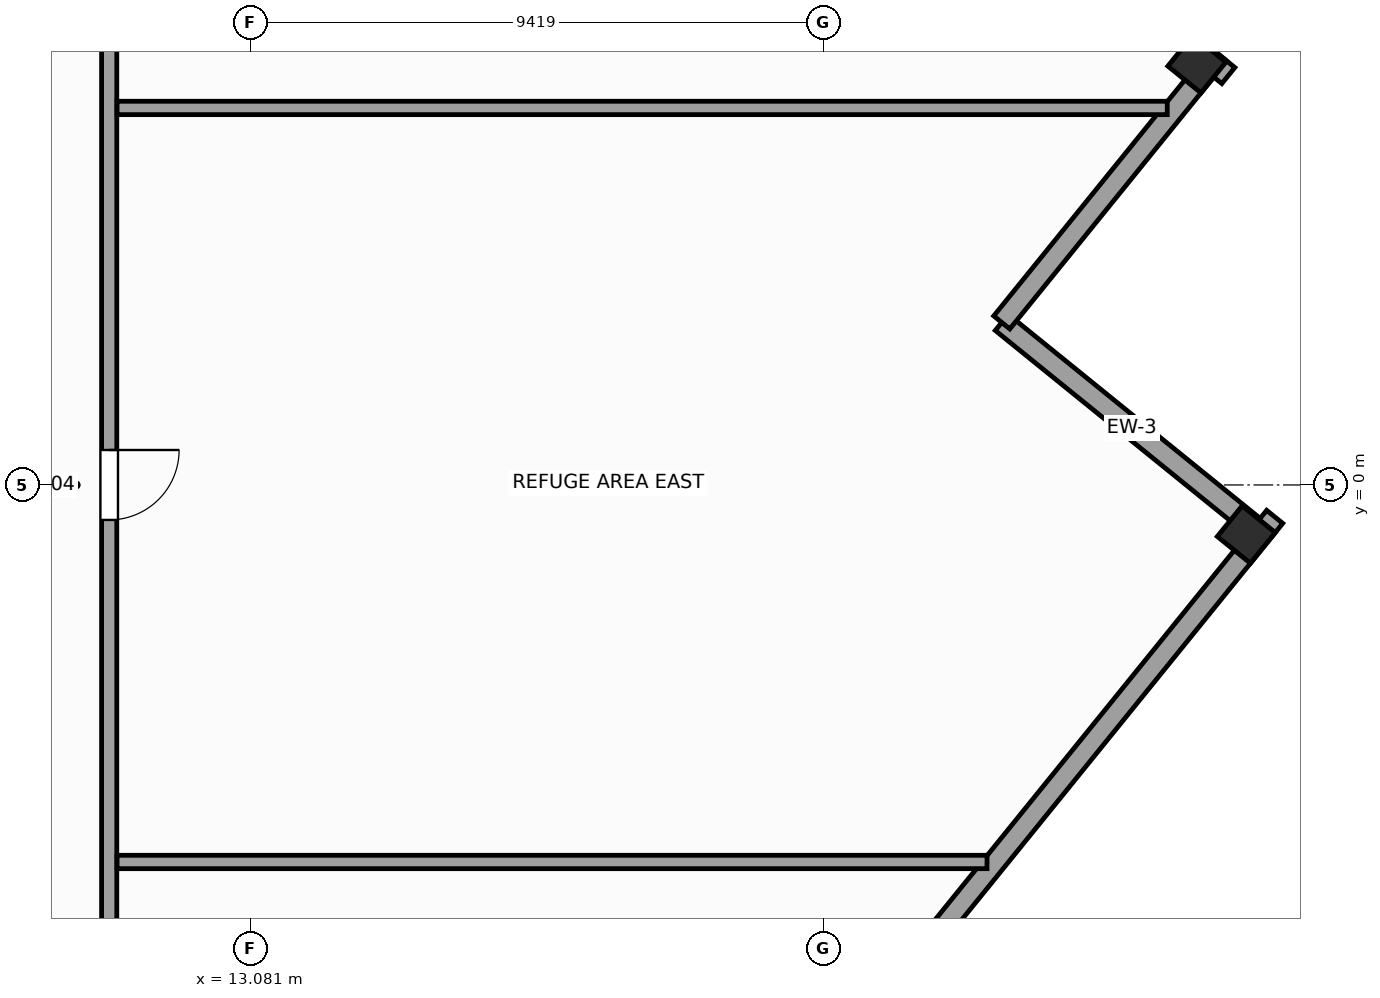
"""IFC4 building model, lengths in metres.
Left out: names, types, materials, properties, quantities, classifications, styles, units other than length and angle.
Written with IfcOpenShell. Run it as: python <this file> out.ifc"""

import sys

from ifc_helpers import new_model, si_unit, direction, frame, frame_2d, origin, origin_2d, place, context, subcontext, project, spatial, rectangle, extrude, source, transform, mapped, element, fill, save


model = new_model("IFC4")
c1 = context("Model", 3, precision=1e-05, world=origin(), true_north=direction((0.0, 1.0)))
c2 = subcontext(c1, "Body", "Model", "MODEL_VIEW")
j1 = project(units=[si_unit("LENGTHUNIT", "METRE"), si_unit("PLANEANGLEUNIT", "RADIAN")], contexts=[c1])
p1 = place(None, origin())
s1 = spatial("IfcSite", under=j1, at=p1, CompositionType="ELEMENT")
p2 = place(p1, origin())
s2 = spatial("IfcBuilding", under=s1, at=p2, CompositionType="ELEMENT")
p3 = place(p2, frame((0.0, 0.0, 200.4)))
s3 = spatial("IfcBuildingStorey", under=s2, at=p3, CompositionType="ELEMENT", Elevation=200.4)
m1 = source(origin(), c2, "Body", "SweptSolid", [
    extrude(rectangle(XDim=0.65, YDim=0.7, at=origin_2d()), origin(), (0.0, 0.0, 1.0), 5.2),
])
for number, where, z_axis, x_axis in (
    (1, (29.45, -0.815, 0.0), (0.0, 0.0, 1.0), (0.629, 0.777, 0.0)),
    (2, (28.637, 6.92, 0.0), (0.0, 0.0, 1.0), (0.629, 0.777, 0.0)),
):
    element("IfcColumn", number, at=place(p3, frame(where, z_axis=z_axis, x_axis=x_axis)), inside=s3, PredefinedType="COLUMN", context=c2, shape_type="MappedRepresentation", body=[
        mapped(m1, transform((0.0, 0.0, 0.0), scale=1.0)),
    ])
p4 = place(p3, frame((29.703, -0.789, 0.0), z_axis=(0.0, 0.0, 1.0), x_axis=(-0.77714355312, 0.629323365087, 0.0)))
e3 = element("IfcWall", 3, at=p4, inside=s3, PredefinedType="STANDARD", context=c2, shape_type="SweptSolid", body=[
    extrude(rectangle(XDim=5.5, YDim=0.34, at=frame_2d((2.75, 0.0))), origin(), (0.0, 0.0, 1.0), 4.96),
])
p5 = place(p3, frame((25.429, 2.673, 0.0), z_axis=(0.0, 0.0, 1.0), x_axis=(0.629299794138, 0.777162640055, 0.0)))
e4 = element("IfcWall", 4, at=p5, inside=s3, PredefinedType="STANDARD", context=c2, shape_type="SweptSolid", body=[
    extrude(rectangle(XDim=5.67, YDim=0.34, at=frame_2d((2.835, 0.0))), origin(), (0.0, 0.0, 1.0), 4.96),
])
p6 = place(p3, frame((17.696, -15.616, 0.0), z_axis=(0.0, 0.0, 1.0), x_axis=(0.629324798011, 0.777142392749, 0.0)))
e5 = element("IfcWall", 5, at=p6, inside=s3, PredefinedType="STANDARD", context=c2, shape_type="SweptSolid", body=[
    extrude(rectangle(XDim=19.42, YDim=0.34, at=frame_2d((9.71, 0.0))), origin(), (0.0, 0.0, 1.0), 4.26),
])
p7 = place(p6, frame((7.739, 0.0, 0.65)))
e6 = element("IfcOpeningElement", 6, at=p7, cuts=e5, PredefinedType="OPENING", context=c2, shape_type="SweptSolid", body=[
    extrude(rectangle(XDim=2.0, YDim=1.45, at=frame_2d((1.0, 0.725))), frame((0.0, 0.18, 0.0), z_axis=(0.0, -1.0, 0.0), x_axis=(1.0, 0.0, 0.0)), (0.0, 0.0, 1.0), 0.36),
])
p8 = place(p3, frame((29.154, 6.733, 0.0), z_axis=(0.0, 0.0, 1.0), x_axis=(-0.777138681893, 0.629329380456, 0.0)))
e7 = element("IfcWall", 7, at=p8, inside=s3, PredefinedType="STANDARD", context=c2, shape_type="SweptSolid", body=[
    extrude(rectangle(XDim=18.42, YDim=0.34, at=frame_2d((9.21, 0.0))), origin(), (0.0, 0.0, 1.0), 4.26),
])
p9 = place(p3, frame((10.75, -12.05, 0.0), z_axis=(0.0, 0.0, 1.0), x_axis=(0.0, 1.0, 0.0)))
e8 = element("IfcWall", 8, at=p9, inside=s3, PredefinedType="PARTITIONING", context=c2, shape_type="SweptSolid", body=[
    extrude(rectangle(XDim=24.1, YDim=0.25, at=frame_2d((12.05, 0.0))), origin(), (0.0, 0.0, 1.0), 4.96),
])
p10 = place(p9, frame((20.436, 0.0, 0.0)))
e9 = element("IfcOpeningElement", 9, at=p10, cuts=e8, PredefinedType="OPENING", context=c2, shape_type="SweptSolid", body=[
    extrude(rectangle(XDim=1.15, YDim=2.25, at=frame_2d((0.575, 1.125))), frame((0.0, 0.135, 0.0), z_axis=(0.0, -1.0, 0.0), x_axis=(1.0, 0.0, 0.0)), (0.0, 0.0, 1.0), 0.27),
])
p11 = place(p9, frame((11.475, 0.0, 0.0)))
e10 = element("IfcOpeningElement", 10, at=p11, cuts=e8, PredefinedType="OPENING", context=c2, shape_type="SweptSolid", body=[
    extrude(rectangle(XDim=1.15, YDim=2.25, at=frame_2d((0.575, 1.125))), frame((0.0, 0.135, 0.0), z_axis=(0.0, -1.0, 0.0), x_axis=(1.0, 0.0, 0.0)), (0.0, 0.0, 1.0), 0.27),
])
p12 = place(p3, frame((10.88, 6.2, 0.0), z_axis=(0.0, 0.0, 1.0), x_axis=(1.0, 0.0, 0.0)))
e11 = element("IfcWall", 11, at=p12, inside=s3, PredefinedType="PARTITIONING", context=c2, shape_type="SweptSolid", body=[
    extrude(rectangle(XDim=17.27, YDim=0.22, at=frame_2d((8.635, 0.0))), origin(), (0.0, 0.0, 1.0), 4.96),
])
p13 = place(p3, frame((10.88, -6.2, 0.0), z_axis=(0.0, 0.0, 1.0), x_axis=(1.0, 0.0, 0.0)))
e12 = element("IfcWall", 12, at=p13, inside=s3, PredefinedType="PARTITIONING", context=c2, shape_type="SweptSolid", body=[
    extrude(rectangle(XDim=14.306, YDim=0.22, at=frame_2d((7.153, 0.0))), origin(), (0.0, 0.0, 1.0), 4.96),
])
m2 = source(origin(), c2, "Body", "SweptSolid", [
    extrude(rectangle(XDim=1.15, YDim=2.25, at=frame_2d((0.575, 1.125))), frame((0.0, 0.025, 0.0), z_axis=(0.0, -1.0, 0.0), x_axis=(1.0, 0.0, 0.0)), (0.0, 0.0, 1.0), 0.05),
])
p14 = place(p11, frame((1.15, 0.0, 0.0), z_axis=(0.0, 0.0, 1.0), x_axis=(-1.0, 0.0, 0.0)))
e13 = element("IfcDoor", 13, at=p14, inside=s3, OperationType="SINGLE_SWING_RIGHT", PredefinedType="DOOR", context=c2, shape_type="MappedRepresentation", body=[
    mapped(m2, transform((0.0, 0.0, 0.0), scale=1.0)),
])
fill(e10, e13)
save(model, sys.argv[1])
